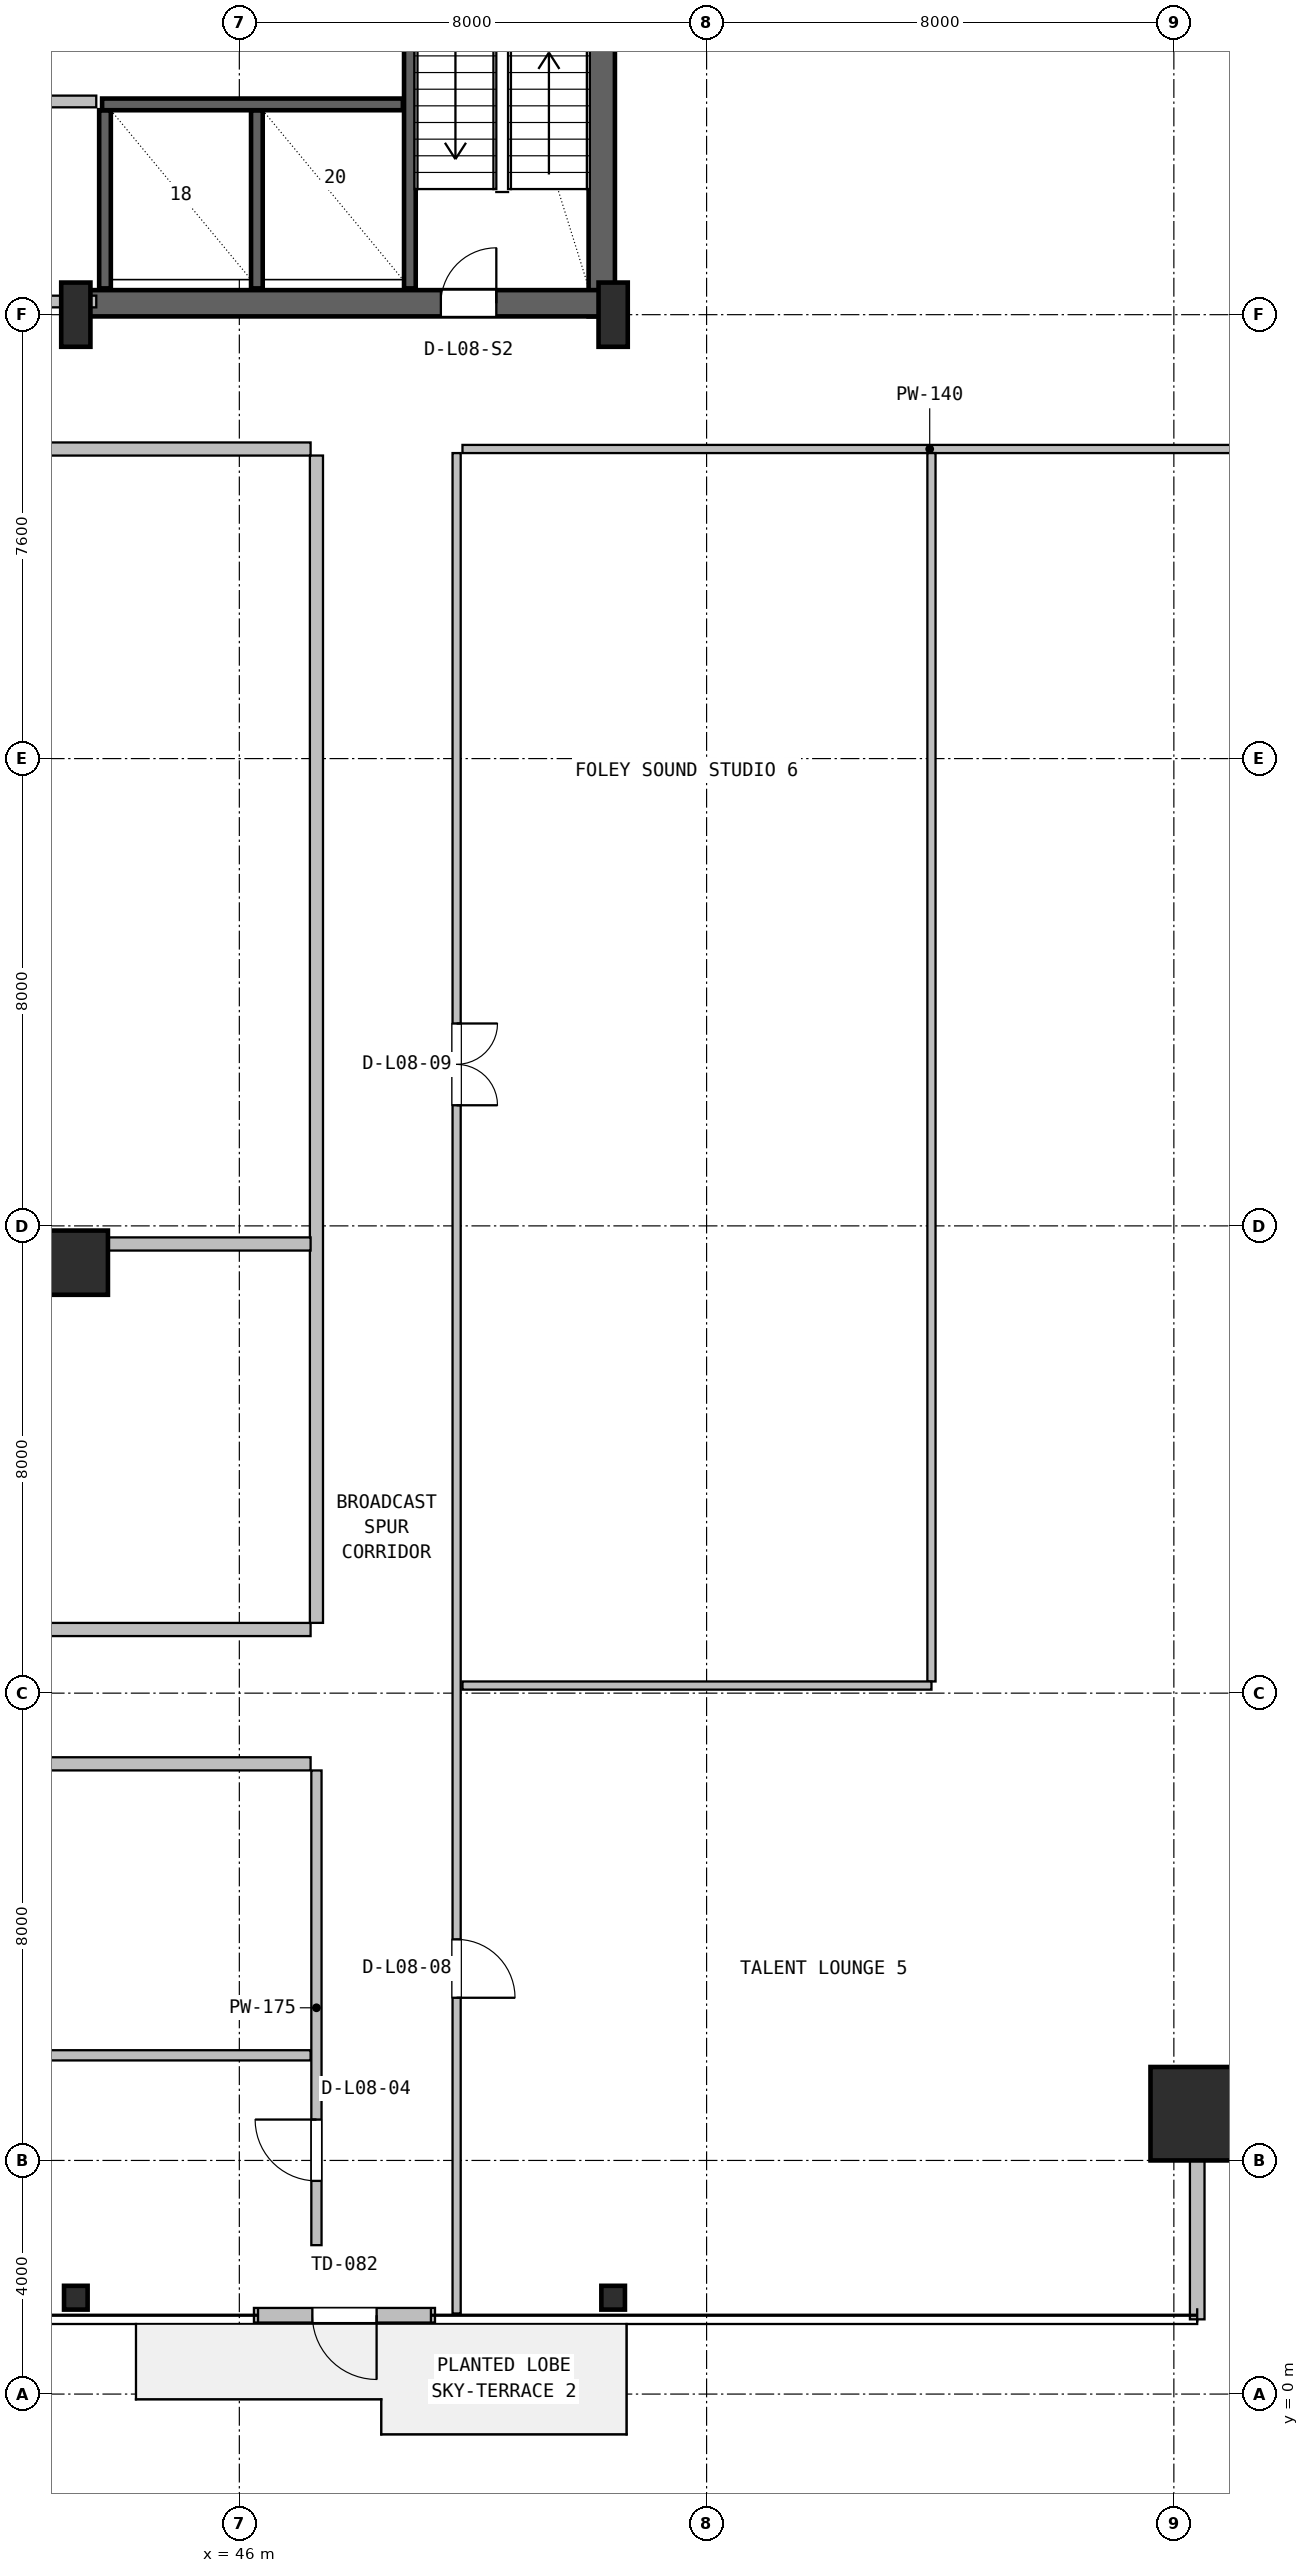
"""IFC4 building model, lengths in metres.
Left out: names, types, materials, properties, quantities, classifications, styles, units other than length and angle.
Written with IfcOpenShell. Run it as: python <this file> out.ifc"""

import sys

from ifc_helpers import new_model, si_unit, direction, frame, frame_2d, origin, origin_2d, place, context, subcontext, project, spatial, rectangle, hollow_rectangle, i_section, extrude, source, transform, mapped, element, fill, save


model = new_model("IFC4")
c1 = context("Model", 3, precision=1e-05, world=origin(), true_north=direction((0.0, 1.0)))
c2 = subcontext(c1, "Body", "Model", "MODEL_VIEW")
j1 = project(units=[si_unit("LENGTHUNIT", "METRE"), si_unit("PLANEANGLEUNIT", "RADIAN")], contexts=[c1])
p1 = place(None, origin())
s1 = spatial("IfcSite", under=j1, at=p1, CompositionType="ELEMENT")
p2 = place(p1, origin())
s2 = spatial("IfcBuilding", under=s1, at=p2, CompositionType="ELEMENT")
p3 = place(p2, frame((0.0, 0.0, 39.3)))
s3 = spatial("IfcBuildingStorey", under=s2, at=p3, CompositionType="ELEMENT", Elevation=39.3)
p4 = place(p3, frame((52.205, 35.57, 0.0), z_axis=(0.0, 0.0, 1.0), x_axis=(0.0, 1.0, 0.0)))
e1 = element("IfcWall", 1, at=p4, inside=s3, PredefinedType="SHEAR", context=c2, shape_type="SweptSolid", body=[
    extrude(rectangle(XDim=11.23, YDim=0.45, at=frame_2d((5.615, 0.0))), origin(), (0.0, 0.0, 1.0), 3.65),
])
p5 = place(p3, frame((43.2, 35.795, 0.0), z_axis=(0.0, 0.0, 1.0), x_axis=(1.0, 0.0, 0.0)))
e2 = element("IfcWall", 2, at=p5, inside=s3, PredefinedType="SHEAR", context=c2, shape_type="SweptSolid", body=[
    extrude(rectangle(XDim=9.23, YDim=0.45, at=frame_2d((4.615, 0.0))), origin(), (0.0, 0.0, 1.0), 3.65),
])
p6 = place(p5, frame((6.25, 0.0, 0.0)))
e3 = element("IfcOpeningElement", 3, at=p6, cuts=e2, PredefinedType="OPENING", context=c2, shape_type="SweptSolid", body=[
    extrude(rectangle(XDim=0.95, YDim=2.1, at=frame_2d((0.475, 1.05))), frame((0.0, 0.235, 0.0), z_axis=(0.0, -1.0, 0.0), x_axis=(1.0, 0.0, 0.0)), (0.0, 0.0, 1.0), 0.47),
])
m1 = source(origin(), c2, "Body", "SweptSolid", [
    extrude(i_section(OverallWidth=0.5, OverallDepth=1.1, WebThickness=0.018, FlangeThickness=0.032, FilletRadius=0.018, at=origin_2d()), origin(), (0.0, 0.0, 1.0), 3.9),
])
for number, where, z_axis, x_axis in (
    (4, (43.2, 35.6, 0.0), (0.0, 0.0, 1.0), (1.0, 0.0, 0.0)),
    (5, (52.4, 35.6, 0.0), (0.0, 0.0, 1.0), (1.0, 0.0, 0.0)),
):
    element("IfcColumn", number, at=place(p3, frame(where, z_axis=z_axis, x_axis=x_axis)), inside=s3, PredefinedType="COLUMN", context=c2, shape_type="MappedRepresentation", body=[
        mapped(m1, transform((0.0, 0.0, 0.0), x_axis=(1.0, 0.0, 0.0), y_axis=(0.0, 1.0, 0.0), z_axis=(0.0, 0.0, 1.0), scale=1.0)),
    ])
m2 = source(origin(), c2, "Body", "SweptSolid", [
    extrude(hollow_rectangle(XDim=1.6, YDim=1.6, WallThickness=0.06, at=origin_2d()), origin(), (0.0, 0.0, 1.0), 3.9),
])
p7 = place(p3, frame((62.4, 4.8, 0.0), z_axis=(0.0, 0.0, 1.0), x_axis=(1.0, 0.0, 0.0)))
e6 = element("IfcColumn", 6, at=p7, inside=s3, PredefinedType="COLUMN", context=c2, shape_type="MappedRepresentation", body=[
    mapped(m2, transform((0.0, 0.0, 0.0), x_axis=(1.0, 0.0, 0.0), y_axis=(0.0, 1.0, 0.0), z_axis=(0.0, 0.0, 1.0), scale=1.0)),
])
m3 = source(origin(), c2, "Body", "SweptSolid", [
    extrude(i_section(OverallWidth=0.404, OverallDepth=0.407, WebThickness=0.027, FlangeThickness=0.044, FilletRadius=0.018, at=origin_2d()), origin(), (0.0, 0.0, 1.0), 3.9),
])
for number, where, z_axis, x_axis in (
    (7, (43.2, 1.65, 0.0), (0.0, 0.0, 1.0), (1.0, 0.0, 0.0)),
    (8, (52.4, 1.65, 0.0), (0.0, 0.0, 1.0), (1.0, 0.0, 0.0)),
):
    element("IfcColumn", number, at=place(p3, frame(where, z_axis=z_axis, x_axis=x_axis)), inside=s3, PredefinedType="COLUMN", context=c2, shape_type="MappedRepresentation", body=[
        mapped(m3, transform((0.0, 0.0, 0.0), x_axis=(1.0, 0.0, 0.0), y_axis=(0.0, 1.0, 0.0), z_axis=(0.0, 0.0, 1.0), scale=1.0)),
    ])
m4 = source(origin(), c2, "Body", "SweptSolid", [
    extrude(rectangle(XDim=1.1, YDim=1.1, at=origin_2d()), origin(), (0.0, 0.0, 1.0), 3.9),
])
p8 = place(p3, frame((43.2, 19.37, 0.0), z_axis=(0.0, 0.0, 1.0), x_axis=(1.0, 0.0, 0.0)))
e9 = element("IfcColumn", 9, at=p8, inside=s3, PredefinedType="COLUMN", context=c2, shape_type="MappedRepresentation", body=[
    mapped(m4, transform((0.0, 0.0, 0.0), x_axis=(1.0, 0.0, 0.0), y_axis=(0.0, 1.0, 0.0), z_axis=(0.0, 0.0, 1.0), scale=1.0)),
])
p9 = place(p3, frame((46.25, 1.35, 0.0), z_axis=(0.0, 0.0, 1.0), x_axis=(1.0, 0.0, 0.0)))
e10 = element("IfcWall", 10, at=p9, inside=s3, PredefinedType="SOLIDWALL", context=c2, shape_type="SweptSolid", body=[
    extrude(rectangle(XDim=3.1, YDim=0.25, at=frame_2d((1.55, 0.0))), origin(), (0.0, 0.0, 1.0), 3.63),
])
p10 = place(p9, frame((1.0, 0.0, 0.0)))
e11 = element("IfcOpeningElement", 11, at=p10, cuts=e10, PredefinedType="OPENING", context=c2, shape_type="SweptSolid", body=[
    extrude(rectangle(XDim=1.1, YDim=2.15, at=frame_2d((0.55, 1.075))), frame((0.0, 0.135, 0.0), z_axis=(0.0, -1.0, 0.0), x_axis=(1.0, 0.0, 0.0)), (0.0, 0.0, 1.0), 0.27),
])
p11 = place(p3, frame((62.4, 1.28, 0.0), z_axis=(0.0, 0.0, 1.0), x_axis=(0.0, 1.0, 0.0)))
e12 = element("IfcWall", 12, at=p11, inside=s3, PredefinedType="SOLIDWALL", context=c2, shape_type="SweptSolid", body=[
    extrude(rectangle(XDim=3.6, YDim=0.25, at=frame_2d((1.8, 0.0))), origin(), (0.0, 0.0, 1.0), 3.208),
])
p12 = place(p3, frame((48.92, 36.05, 0.0), z_axis=(0.0, 0.0, 1.0), x_axis=(0.0, 1.0, 0.0)))
e13 = element("IfcWall", 13, at=p12, inside=s3, PredefinedType="SHEAR", context=c2, shape_type="SweptSolid", body=[
    extrude(rectangle(XDim=10.5, YDim=0.2, at=frame_2d((5.25, 0.0))), origin(), (0.0, 0.0, 1.0), 3.65),
])
for number, where, z_axis, x_axis in (
    (14, (43.7, 36.05, 0.0), (0.0, 0.0, 1.0), (0.0, 1.0, 0.0)),
    (15, (46.3, 36.05, 0.0), (0.0, 0.0, 1.0), (0.0, 1.0, 0.0)),
):
    element("IfcWall", number, at=place(p3, frame(where, z_axis=z_axis, x_axis=x_axis)), inside=s3, PredefinedType="SHEAR", context=c2, shape_type="SweptSolid", body=[
        extrude(rectangle(XDim=3.05, YDim=0.2, at=frame_2d((1.525, 0.0))), origin(), (0.0, 0.0, 1.0), 3.65),
    ])
p13 = place(p3, frame((43.65, 39.2, 0.0), z_axis=(0.0, 0.0, 1.0), x_axis=(1.0, 0.0, 0.0)))
e16 = element("IfcWall", 16, at=p13, inside=s3, PredefinedType="SHEAR", context=c2, shape_type="SweptSolid", body=[
    extrude(rectangle(XDim=5.15, YDim=0.2, at=frame_2d((2.575, 0.0))), origin(), (0.0, 0.0, 1.0), 3.65),
])
p14 = place(p3, frame((39.85, 35.825, 0.0), z_axis=(0.0, 0.0, 1.0), x_axis=(1.0, 0.0, 0.0)))
e17 = element("IfcWall", 17, at=p14, inside=s3, PredefinedType="SOLIDWALL", context=c2, shape_type="SweptSolid", body=[
    extrude(rectangle(XDim=3.7, YDim=0.2, at=frame_2d((1.85, 0.0))), origin(), (0.0, 0.0, 1.0), 2.425),
])
p15 = place(p3, frame((39.85, 39.25, 0.0), z_axis=(0.0, 0.0, 1.0), x_axis=(1.0, 0.0, 0.0)))
e18 = element("IfcWall", 18, at=p15, inside=s3, PredefinedType="SOLIDWALL", context=c2, shape_type="SweptSolid", body=[
    extrude(rectangle(XDim=3.7, YDim=0.2, at=frame_2d((1.85, 0.0))), origin(), (0.0, 0.0, 1.0), 3.63),
])
p16 = place(p15, frame((1.25, 0.0, 0.0)))
e19 = element("IfcOpeningElement", 19, at=p16, cuts=e18, PredefinedType="OPENING", context=c2, shape_type="SweptSolid", body=[
    extrude(rectangle(XDim=1.2, YDim=2.1, at=frame_2d((0.6, 1.05))), frame((0.0, 0.11, 0.0), z_axis=(0.0, -1.0, 0.0), x_axis=(1.0, 0.0, 0.0)), (0.0, 0.0, 1.0), 0.22),
])
p17 = place(p3, frame((47.32, 2.55, 0.0), z_axis=(0.0, 0.0, 1.0), x_axis=(0.0, 1.0, 0.0)))
e20 = element("IfcWall", 20, at=p17, inside=s3, PredefinedType="PARTITIONING", context=c2, shape_type="SweptSolid", body=[
    extrude(rectangle(XDim=8.127, YDim=0.175, at=frame_2d((4.063, 0.0))), origin(), (0.0, 0.0, 1.0), 3.322),
])
p18 = place(p17, frame((1.1, 0.0, 0.0)))
e21 = element("IfcOpeningElement", 21, at=p18, cuts=e20, PredefinedType="OPENING", context=c2, shape_type="SweptSolid", body=[
    extrude(rectangle(XDim=1.05, YDim=2.1, at=frame_2d((0.525, 1.05))), frame((0.0, 0.098, 0.0), z_axis=(0.0, -1.0, 0.0), x_axis=(1.0, 0.0, 0.0)), (0.0, 0.0, 1.0), 0.195),
])
p19 = place(p3, frame((2.18, 5.8, 0.0), z_axis=(0.0, 0.0, 1.0), x_axis=(1.0, 0.0, 0.0)))
e22 = element("IfcWall", 22, at=p19, inside=s3, PredefinedType="PARTITIONING", context=c2, shape_type="SweptSolid", body=[
    extrude(rectangle(XDim=45.04, YDim=0.175, at=frame_2d((22.52, 0.0))), origin(), (0.0, 0.0, 1.0), 2.852),
])
p20 = place(p3, frame((2.18, 10.79, 0.0), z_axis=(0.0, 0.0, 1.0), x_axis=(1.0, 0.0, 0.0)))
e23 = element("IfcWall", 23, at=p20, inside=s3, PredefinedType="PARTITIONING", context=c2, shape_type="SweptSolid", body=[
    extrude(rectangle(XDim=45.04, YDim=0.225, at=frame_2d((22.52, 0.0))), origin(), (0.0, 0.0, 1.0), 2.852),
])
p21 = place(p20, frame((23.755, 0.0, 0.0)))
e24 = element("IfcOpeningElement", 24, at=p21, cuts=e23, PredefinedType="OPENING", context=c2, shape_type="SweptSolid", body=[
    extrude(rectangle(XDim=1.4, YDim=2.12, at=frame_2d((0.7, 1.06))), frame((0.0, 0.123, 0.0), z_axis=(0.0, -1.0, 0.0), x_axis=(1.0, 0.0, 0.0)), (0.0, 0.0, 1.0), 0.245),
])
p22 = place(p3, frame((2.18, 13.09, 0.0), z_axis=(0.0, 0.0, 1.0), x_axis=(1.0, 0.0, 0.0)))
e25 = element("IfcWall", 25, at=p22, inside=s3, PredefinedType="PARTITIONING", context=c2, shape_type="SweptSolid", body=[
    extrude(rectangle(XDim=45.04, YDim=0.225, at=frame_2d((22.52, 0.0))), origin(), (0.0, 0.0, 1.0), 2.852),
])
p23 = place(p22, frame((23.755, 0.0, 0.0)))
e26 = element("IfcOpeningElement", 26, at=p23, cuts=e25, PredefinedType="OPENING", context=c2, shape_type="SweptSolid", body=[
    extrude(rectangle(XDim=1.4, YDim=2.12, at=frame_2d((0.7, 1.06))), frame((0.0, 0.123, 0.0), z_axis=(0.0, -1.0, 0.0), x_axis=(1.0, 0.0, 0.0)), (0.0, 0.0, 1.0), 0.245),
])
p24 = place(p3, frame((47.32, 13.203, 0.0), z_axis=(0.0, 0.0, 1.0), x_axis=(0.0, 1.0, 0.0)))
e27 = element("IfcWall", 27, at=p24, inside=s3, PredefinedType="PARTITIONING", context=c2, shape_type="SweptSolid", body=[
    extrude(rectangle(XDim=19.985, YDim=0.225, at=frame_2d((9.993, 0.0))), origin(), (0.0, 0.0, 1.0), 3.322),
])
p25 = place(p3, frame((2.18, 19.69, 0.0), z_axis=(0.0, 0.0, 1.0), x_axis=(1.0, 0.0, 0.0)))
e28 = element("IfcWall", 28, at=p25, inside=s3, PredefinedType="PARTITIONING", context=c2, shape_type="SweptSolid", body=[
    extrude(rectangle(XDim=45.04, YDim=0.225, at=frame_2d((22.52, 0.0))), origin(), (0.0, 0.0, 1.0), 2.852),
])
p26 = place(p3, frame((2.18, 33.3, 0.0), z_axis=(0.0, 0.0, 1.0), x_axis=(1.0, 0.0, 0.0)))
e29 = element("IfcWall", 29, at=p26, inside=s3, PredefinedType="PARTITIONING", context=c2, shape_type="SweptSolid", body=[
    extrude(rectangle(XDim=45.04, YDim=0.225, at=frame_2d((22.52, 0.0))), origin(), (0.0, 0.0, 1.0), 2.852),
])
p27 = place(p26, frame((23.755, 0.0, 0.0)))
e30 = element("IfcOpeningElement", 30, at=p27, cuts=e29, PredefinedType="OPENING", context=c2, shape_type="SweptSolid", body=[
    extrude(rectangle(XDim=1.4, YDim=2.12, at=frame_2d((0.7, 1.06))), frame((0.0, 0.123, 0.0), z_axis=(0.0, -1.0, 0.0), x_axis=(1.0, 0.0, 0.0)), (0.0, 0.0, 1.0), 0.245),
])
p28 = place(p3, frame((49.82, 33.3, 0.0), z_axis=(0.0, 0.0, 1.0), x_axis=(1.0, 0.0, 0.0)))
e31 = element("IfcWall", 31, at=p28, inside=s3, PredefinedType="PARTITIONING", context=c2, shape_type="SweptSolid", body=[
    extrude(rectangle(XDim=16.0, YDim=0.14, at=frame_2d((8.0, 0.0))), origin(), (0.0, 0.0, 1.0), 3.208),
])
p29 = place(p3, frame((57.85, 12.2, 0.0), z_axis=(0.0, 0.0, 1.0), x_axis=(0.0, 1.0, 0.0)))
e32 = element("IfcWall", 32, at=p29, inside=s3, PredefinedType="PARTITIONING", context=c2, shape_type="SweptSolid", body=[
    extrude(rectangle(XDim=21.03, YDim=0.14, at=frame_2d((10.515, 0.0))), origin(), (0.0, 0.0, 1.0), 3.322),
])
p30 = place(p3, frame((49.82, 12.13, 0.0), z_axis=(0.0, 0.0, 1.0), x_axis=(1.0, 0.0, 0.0)))
e33 = element("IfcWall", 33, at=p30, inside=s3, PredefinedType="PARTITIONING", context=c2, shape_type="SweptSolid", body=[
    extrude(rectangle(XDim=8.03, YDim=0.14, at=frame_2d((4.015, 0.0))), origin(), (0.0, 0.0, 1.0), 3.63),
])
p31 = place(p3, frame((49.72, 1.38, 0.0), z_axis=(0.0, 0.0, 1.0), x_axis=(0.0, 1.0, 0.0)))
e34 = element("IfcWall", 34, at=p31, inside=s3, PredefinedType="PARTITIONING", context=c2, shape_type="SweptSolid", body=[
    extrude(rectangle(XDim=31.85, YDim=0.14, at=frame_2d((15.925, 0.0))), origin(), (0.0, 0.0, 1.0), 3.208),
])
p32 = place(p31, frame((5.405, 0.0, 0.0)))
e35 = element("IfcOpeningElement", 35, at=p32, cuts=e34, PredefinedType="OPENING", context=c2, shape_type="SweptSolid", body=[
    extrude(rectangle(XDim=1.0, YDim=2.1, at=frame_2d((0.5, 1.05))), frame((0.0, 0.08, 0.0), z_axis=(0.0, -1.0, 0.0), x_axis=(1.0, 0.0, 0.0)), (0.0, 0.0, 1.0), 0.16),
])
p33 = place(p31, frame((20.685, 0.0, 0.0)))
e36 = element("IfcOpeningElement", 36, at=p33, cuts=e34, PredefinedType="OPENING", context=c2, shape_type="SweptSolid", body=[
    extrude(rectangle(XDim=1.4, YDim=2.12, at=frame_2d((0.7, 1.06))), frame((0.0, 0.08, 0.0), z_axis=(0.0, -1.0, 0.0), x_axis=(1.0, 0.0, 0.0)), (0.0, 0.0, 1.0), 0.16),
])
m5 = source(origin(), c2, "Body", "SweptSolid", [
    extrude(rectangle(XDim=1.1, YDim=2.15, at=frame_2d((0.55, 1.075))), frame((0.0, 0.025, 0.0), z_axis=(0.0, -1.0, 0.0), x_axis=(1.0, 0.0, 0.0)), (0.0, 0.0, 1.0), 0.05),
])
p34 = place(p10, frame((1.1, 0.0, 0.0), z_axis=(0.0, 0.0, 1.0), x_axis=(-1.0, 0.0, 0.0)))
e37 = element("IfcDoor", 37, at=p34, inside=s3, OperationType="SINGLE_SWING_RIGHT", PredefinedType="DOOR", context=c2, shape_type="MappedRepresentation", body=[
    mapped(m5, transform((0.0, 0.0, 0.0), x_axis=(1.0, 0.0, 0.0), y_axis=(0.0, 1.0, 0.0), z_axis=(0.0, 0.0, 1.0), scale=1.0)),
])
fill(e11, e37)
m6 = source(origin(), c2, "Body", "SweptSolid", [
    extrude(rectangle(XDim=0.95, YDim=2.1, at=frame_2d((0.475, 1.05))), frame((0.0, 0.025, 0.0), z_axis=(0.0, -1.0, 0.0), x_axis=(1.0, 0.0, 0.0)), (0.0, 0.0, 1.0), 0.05),
])
p35 = place(p6, origin())
e38 = element("IfcDoor", 38, at=p35, inside=s3, OperationType="SINGLE_SWING_RIGHT", PredefinedType="DOOR", context=c2, shape_type="MappedRepresentation", body=[
    mapped(m6, transform((0.0, 0.0, 0.0), x_axis=(1.0, 0.0, 0.0), y_axis=(0.0, 1.0, 0.0), z_axis=(0.0, 0.0, 1.0), scale=1.0)),
])
fill(e3, e38)
m7 = source(origin(), c2, "Body", "SweptSolid", [
    extrude(rectangle(XDim=1.05, YDim=2.1, at=frame_2d((0.525, 1.05))), frame((0.0, 0.025, 0.0), z_axis=(0.0, -1.0, 0.0), x_axis=(1.0, 0.0, 0.0)), (0.0, 0.0, 1.0), 0.05),
])
p36 = place(p18, origin())
e39 = element("IfcDoor", 39, at=p36, inside=s3, OperationType="SINGLE_SWING_RIGHT", PredefinedType="DOOR", context=c2, shape_type="MappedRepresentation", body=[
    mapped(m7, transform((0.0, 0.0, 0.0), x_axis=(1.0, 0.0, 0.0), y_axis=(0.0, 1.0, 0.0), z_axis=(0.0, 0.0, 1.0), scale=1.0)),
])
fill(e21, e39)
m8 = source(origin(), c2, "Body", "SweptSolid", [
    extrude(rectangle(XDim=1.0, YDim=2.1, at=frame_2d((0.5, 1.05))), frame((0.0, 0.025, 0.0), z_axis=(0.0, -1.0, 0.0), x_axis=(1.0, 0.0, 0.0)), (0.0, 0.0, 1.0), 0.05),
])
p37 = place(p32, frame((1.0, 0.0, 0.0), z_axis=(0.0, 0.0, 1.0), x_axis=(-1.0, 0.0, 0.0)))
e40 = element("IfcDoor", 40, at=p37, inside=s3, OperationType="SINGLE_SWING_LEFT", PredefinedType="DOOR", context=c2, shape_type="MappedRepresentation", body=[
    mapped(m8, transform((0.0, 0.0, 0.0), x_axis=(1.0, 0.0, 0.0), y_axis=(0.0, 1.0, 0.0), z_axis=(0.0, 0.0, 1.0), scale=1.0)),
])
fill(e35, e40)
m9 = source(origin(), c2, "Body", "SweptSolid", [
    extrude(rectangle(XDim=1.4, YDim=2.12, at=frame_2d((0.7, 1.06))), frame((0.0, 0.025, 0.0), z_axis=(0.0, -1.0, 0.0), x_axis=(1.0, 0.0, 0.0)), (0.0, 0.0, 1.0), 0.05),
])
p38 = place(p33, frame((1.4, 0.0, 0.0), z_axis=(0.0, 0.0, 1.0), x_axis=(-1.0, 0.0, 0.0)))
e41 = element("IfcDoor", 41, at=p38, inside=s3, OperationType="DOUBLE_DOOR_SINGLE_SWING", PredefinedType="DOOR", context=c2, shape_type="MappedRepresentation", body=[
    mapped(m9, transform((0.0, 0.0, 0.0), x_axis=(1.0, 0.0, 0.0), y_axis=(0.0, 1.0, 0.0), z_axis=(0.0, 0.0, 1.0), scale=1.0)),
])
fill(e36, e41)
save(model, sys.argv[1])
